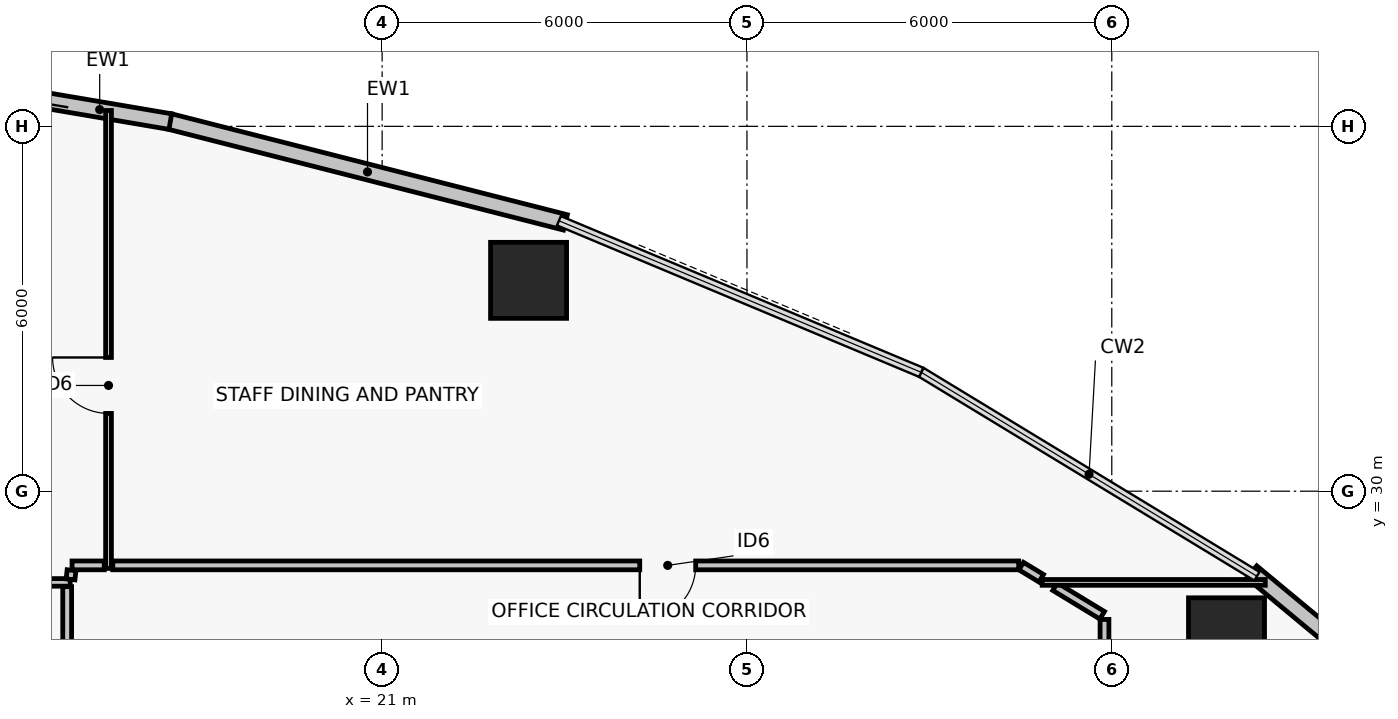
"""IFC4 building model, lengths in metres.
Left out: names, types, materials, properties, quantities, classifications, styles, units other than length and angle.
Written with IfcOpenShell. Run it as: python <this file> out.ifc"""

import sys

from ifc_helpers import new_model, si_unit, direction, frame, frame_2d, origin, origin_2d, place, context, subcontext, project, spatial, rectangle, hollow_rectangle, extrude, element, fill, save


model = new_model("IFC4")
c1 = context("Model", 3, precision=1e-05, world=origin(), true_north=direction((0.0, 1.0)))
c2 = subcontext(c1, "Body", "Model", "MODEL_VIEW")
j1 = project(units=[si_unit("LENGTHUNIT", "METRE"), si_unit("PLANEANGLEUNIT", "RADIAN")], contexts=[c1])
p1 = place(None, origin())
s1 = spatial("IfcSite", under=j1, at=p1, CompositionType="ELEMENT")
p2 = place(p1, origin())
s2 = spatial("IfcBuilding", under=s1, at=p2, CompositionType="ELEMENT")
p3 = place(p2, frame((0.0, 0.0, 79.68)))
s3 = spatial("IfcBuildingStorey", under=s2, at=p3, CompositionType="ELEMENT", Elevation=79.68)
for number, where, z_axis, x_axis in (
    (1, (34.887, 27.622, 0.0), (0.0, 0.0, 1.0), (1.0, 0.0, 0.0)),
    (2, (23.408, 33.467, 0.0), (0.0, 0.0, 1.0), (1.0, 0.0, 0.0)),
):
    element("IfcColumn", number, at=place(p3, frame(where, z_axis=z_axis, x_axis=x_axis)), inside=s3, PredefinedType="COLUMN", context=c2, shape_type="SweptSolid", body=[
        extrude(hollow_rectangle(XDim=1.25, YDim=1.25, WallThickness=0.05, at=origin_2d()), origin(), (0.0, 0.0, 1.0), 3.72),
    ])
p4 = place(p3, frame((35.301, 28.672, 0.0), z_axis=(0.0, 0.0, 1.0), x_axis=(0.76975316947, -0.638341646841, 0.0)))
e3 = element("IfcWall", 3, at=p4, inside=s3, PredefinedType="PARTITIONING", context=c2, shape_type="SweptSolid", body=[
    extrude(rectangle(XDim=6.718, YDim=0.26, at=frame_2d((3.359, 0.0))), origin(), (0.0, 0.0, 1.0), 3.38),
])
p5 = place(p3, frame((17.505, 36.081, 0.0), z_axis=(0.0, 0.0, 1.0), x_axis=(0.968981437296, -0.247133514876, 0.0)))
e4 = element("IfcWall", 4, at=p5, inside=s3, PredefinedType="PARTITIONING", context=c2, shape_type="SweptSolid", body=[
    extrude(rectangle(XDim=6.718, YDim=0.26, at=frame_2d((3.359, 0.0))), origin(), (0.0, 0.0, 1.0), 3.38),
])
p6 = place(p3, frame((15.193, 36.472, 0.0), z_axis=(0.0, 0.0, 1.0), x_axis=(0.985905269947, -0.167304508875, 0.0)))
e5 = element("IfcWall", 5, at=p6, inside=s3, PredefinedType="PARTITIONING", context=c2, shape_type="SweptSolid", body=[
    extrude(rectangle(XDim=2.357, YDim=0.26, at=frame_2d((1.178, 0.0))), origin(), (0.0, 0.0, 1.0), 3.38),
])
p7 = place(p3, frame((32.88, 27.22, 0.0), z_axis=(0.0, 0.0, 1.0), x_axis=(0.0, 1.0, 0.0)))
e6 = element("IfcWall", 6, at=p7, inside=s3, PredefinedType="PARTITIONING", context=c2, shape_type="SweptSolid", body=[
    extrude(rectangle(XDim=0.671, YDim=0.145, at=frame_2d((0.335, 0.0))), origin(), (0.0, 0.0, 1.0), 2.51),
])
p8 = place(p3, frame((32.842, 27.96, 0.0), z_axis=(0.0, 0.0, 1.0), x_axis=(-0.854770437211, 0.519006261686, 0.0)))
e7 = element("IfcWall", 7, at=p8, inside=s3, PredefinedType="PARTITIONING", context=c2, shape_type="SweptSolid", body=[
    extrude(rectangle(XDim=0.906, YDim=0.145, at=frame_2d((0.453, 0.0))), origin(), (0.0, 0.0, 1.0), 2.91),
])
p9 = place(p3, frame((31.84, 28.568, 0.0), z_axis=(0.0, 0.0, 1.0), x_axis=(-0.854857682939, 0.518862546269, 0.0)))
e8 = element("IfcWall", 8, at=p9, inside=s3, PredefinedType="PARTITIONING", context=c2, shape_type="SweptSolid", body=[
    extrude(rectangle(XDim=0.386, YDim=0.145, at=frame_2d((0.193, 0.0))), origin(), (0.0, 0.0, 1.0), 2.91),
])
p10 = place(p3, frame((31.469, 28.78, 0.0), z_axis=(0.0, 0.0, 1.0), x_axis=(-1.0, 0.0, 0.0)))
e9 = element("IfcWall", 9, at=p10, inside=s3, PredefinedType="PARTITIONING", context=c2, shape_type="SweptSolid", body=[
    extrude(rectangle(XDim=14.898, YDim=0.145, at=frame_2d((7.449, 0.0))), origin(), (0.0, 0.0, 1.0), 2.51),
])
p11 = place(p10, frame((5.312, 0.0, 0.0)))
e10 = element("IfcOpeningElement", 10, at=p11, cuts=e9, PredefinedType="OPENING", context=c2, shape_type="SweptSolid", body=[
    extrude(rectangle(XDim=0.92, YDim=2.05, at=frame_2d((0.46, 1.025))), frame((0.0, 0.083, 0.0), z_axis=(0.0, -1.0, 0.0), x_axis=(1.0, 0.0, 0.0)), (0.0, 0.0, 1.0), 0.165),
])
p12 = place(p3, frame((16.43, 28.78, 0.0), z_axis=(0.0, 0.0, 1.0), x_axis=(-1.0, 0.0, 0.0)))
e11 = element("IfcWall", 11, at=p12, inside=s3, PredefinedType="PARTITIONING", context=c2, shape_type="SweptSolid", body=[
    extrude(rectangle(XDim=0.53, YDim=0.145, at=frame_2d((0.265, 0.0))), origin(), (0.0, 0.0, 1.0), 2.91),
])
p13 = place(p3, frame((15.82, 28.43, 0.0), z_axis=(0.0, 0.0, 1.0), x_axis=(0.0, -1.0, 0.0)))
e12 = element("IfcWall", 12, at=p13, inside=s3, PredefinedType="PARTITIONING", context=c2, shape_type="SweptSolid", body=[
    extrude(rectangle(XDim=6.36, YDim=0.145, at=frame_2d((3.18, 0.0))), origin(), (0.0, 0.0, 1.0), 2.51),
])
p14 = place(p13, frame((5.16, 0.0, 0.0)))
e13 = element("IfcOpeningElement", 13, at=p14, cuts=e12, PredefinedType="OPENING", context=c2, shape_type="SweptSolid", body=[
    extrude(rectangle(XDim=0.92, YDim=2.05, at=frame_2d((0.46, 1.025))), frame((0.0, 0.083, 0.0), z_axis=(0.0, -1.0, 0.0), x_axis=(1.0, 0.0, 0.0)), (0.0, 0.0, 1.0), 0.165),
])
p15 = place(p3, frame((16.5, 28.73, 0.0), z_axis=(0.0, 0.0, 1.0), x_axis=(0.0, 1.0, 0.0)))
e14 = element("IfcWall", 14, at=p15, inside=s3, PredefinedType="PARTITIONING", context=c2, shape_type="SweptSolid", body=[
    extrude(rectangle(XDim=7.531, YDim=0.095, at=frame_2d((3.765, 0.0))), origin(), (0.0, 0.0, 1.0), 2.51),
])
p16 = place(p15, frame((2.549, 0.0, 0.0)))
e15 = element("IfcOpeningElement", 15, at=p16, cuts=e14, PredefinedType="OPENING", context=c2, shape_type="SweptSolid", body=[
    extrude(rectangle(XDim=0.92, YDim=2.05, at=frame_2d((0.46, 1.025))), frame((0.0, 0.057, 0.0), z_axis=(0.0, -1.0, 0.0), x_axis=(1.0, 0.0, 0.0)), (0.0, 0.0, 1.0), 0.115),
])
p17 = place(p3, frame((11.644, 28.5, 0.0), z_axis=(0.0, 0.0, 1.0), x_axis=(1.0, 0.0, 0.0)))
e16 = element("IfcWall", 16, at=p17, inside=s3, PredefinedType="PARTITIONING", context=c2, shape_type="SweptSolid", body=[
    extrude(rectangle(XDim=4.227, YDim=0.125, at=frame_2d((2.113, 0.0))), origin(), (0.0, 0.0, 1.0), 2.76),
])
p18 = place(p3, frame((31.856, 28.5, 0.0), z_axis=(0.0, 0.0, 1.0), x_axis=(1.0, 0.0, 0.0)))
e17 = element("IfcWall", 17, at=p18, inside=s3, PredefinedType="PARTITIONING", context=c2, shape_type="SweptSolid", body=[
    extrude(rectangle(XDim=3.669, YDim=0.095, at=frame_2d((1.834, 0.0))), origin(), (0.0, 0.0, 1.0), 2.76),
])
p19 = place(p3, frame((15.892, 28.7, 0.0), z_axis=(0.0, 0.0, 1.0), x_axis=(-0.107955324157, -0.994155746343, 0.0)))
e18 = element("IfcWall", 18, at=p19, inside=s3, PredefinedType="PARTITIONING", context=c2, shape_type="SweptSolid", body=[
    extrude(rectangle(XDim=0.152, YDim=0.145, at=frame_2d((0.076, 0.0))), origin(), (0.0, 0.0, 1.0), 3.38),
])
p20 = place(p11, origin())
e19 = element("IfcDoor", 19, at=p20, inside=s3, OperationType="SINGLE_SWING_RIGHT", PredefinedType="DOOR", context=c2, shape_type="SweptSolid", body=[
    extrude(rectangle(XDim=0.92, YDim=2.05, at=frame_2d((0.46, 1.025))), frame((0.0, 0.025, 0.0), z_axis=(0.0, -1.0, 0.0), x_axis=(1.0, 0.0, 0.0)), (0.0, 0.0, 1.0), 0.05),
])
fill(e10, e19)
p21 = place(p16, origin())
e20 = element("IfcDoor", 20, at=p21, inside=s3, OperationType="SINGLE_SWING_RIGHT", PredefinedType="DOOR", context=c2, shape_type="SweptSolid", body=[
    extrude(rectangle(XDim=0.92, YDim=2.05, at=frame_2d((0.46, 1.025))), frame((0.0, 0.025, 0.0), z_axis=(0.0, -1.0, 0.0), x_axis=(1.0, 0.0, 0.0)), (0.0, 0.0, 1.0), 0.05),
])
fill(e15, e20)
save(model, sys.argv[1])
